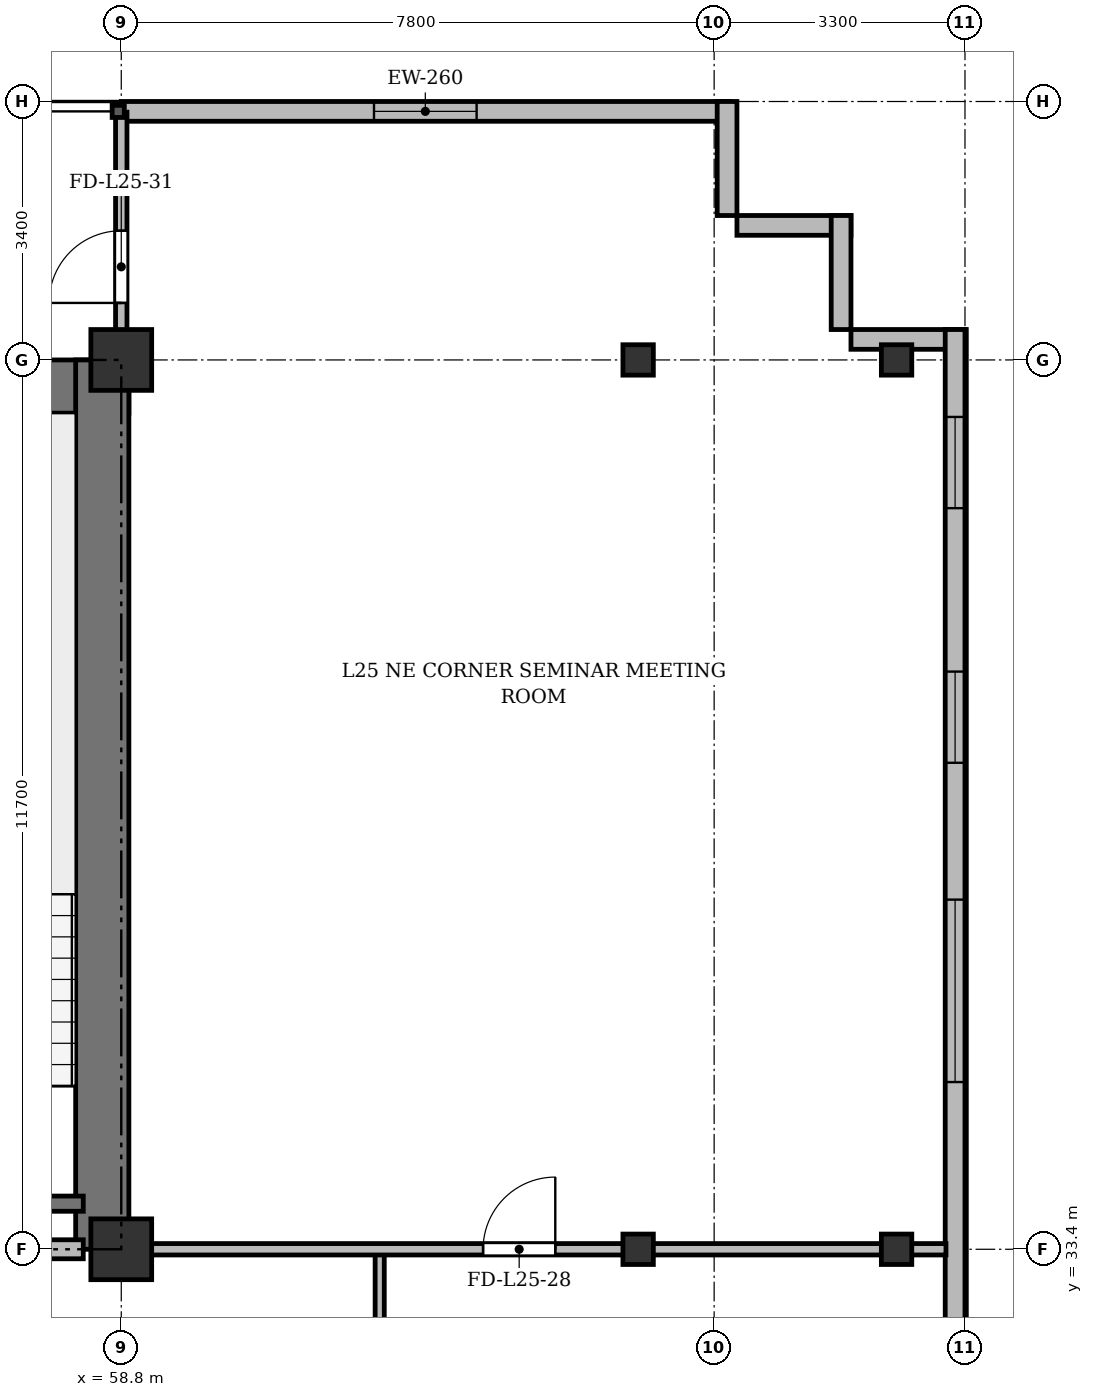
"""IFC4 building model, lengths in metres.
Left out: names, types, materials, properties, quantities, classifications, styles, units other than length and angle.
Written with IfcOpenShell. Run it as: python <this file> out.ifc"""

import sys

from ifc_helpers import new_model, si_unit, direction, frame, frame_2d, origin, origin_2d, place, context, subcontext, project, spatial, rectangle, i_section, extrude, source, transform, mapped, element, fill, save


model = new_model("IFC4")
c1 = context("Model", 3, precision=1e-05, world=origin(), true_north=direction((0.0, 1.0)))
c2 = subcontext(c1, "Body", "Model", "MODEL_VIEW")
j1 = project(units=[si_unit("LENGTHUNIT", "METRE"), si_unit("PLANEANGLEUNIT", "RADIAN")], contexts=[c1])
p1 = place(None, origin())
s1 = spatial("IfcSite", under=j1, at=p1, CompositionType="ELEMENT")
p2 = place(p1, origin())
s2 = spatial("IfcBuilding", under=s1, at=p2, CompositionType="ELEMENT")
p3 = place(p2, frame((0.0, 0.0, 99.7)))
s3 = spatial("IfcBuildingStorey", under=s2, at=p3, CompositionType="ELEMENT", Elevation=99.7)
m1 = source(origin(), c2, "Body", "SweptSolid", [
    extrude(rectangle(XDim=0.8, YDim=0.8, at=origin_2d()), origin(), (0.0, 0.0, 1.0), 3.6),
])
for number, where, z_axis, x_axis in (
    (1, (58.8, 33.4, 0.0), (0.0, 0.0, 1.0), (1.0, 0.0, 0.0)),
    (2, (58.8, 45.1, 0.0), (0.0, 0.0, 1.0), (1.0, 0.0, 0.0)),
):
    element("IfcColumn", number, at=place(p3, frame(where, z_axis=z_axis, x_axis=x_axis)), inside=s3, PredefinedType="COLUMN", context=c2, shape_type="MappedRepresentation", body=[
        mapped(m1, transform((0.0, 0.0, 0.0), x_axis=(1.0, 0.0, 0.0), y_axis=(0.0, 1.0, 0.0), z_axis=(0.0, 0.0, 1.0), scale=1.0)),
    ])
m2 = source(origin(), c2, "Body", "SweptSolid", [
    extrude(i_section(OverallWidth=0.4, OverallDepth=0.4, WebThickness=0.022, FlangeThickness=0.035, at=origin_2d()), origin(), (0.0, 0.0, 1.0), 3.6),
])
for number, where, z_axis, x_axis in (
    (3, (65.6, 33.4, 0.0), (0.0, 0.0, 1.0), (1.0, 0.0, 0.0)),
    (4, (65.6, 45.1, 0.0), (0.0, 0.0, 1.0), (1.0, 0.0, 0.0)),
    (5, (69.0, 33.4, 0.0), (0.0, 0.0, 1.0), (1.0, 0.0, 0.0)),
    (6, (69.0, 45.1, 0.0), (0.0, 0.0, 1.0), (1.0, 0.0, 0.0)),
):
    element("IfcColumn", number, at=place(p3, frame(where, z_axis=z_axis, x_axis=x_axis)), inside=s3, PredefinedType="COLUMN", context=c2, shape_type="MappedRepresentation", body=[
        mapped(m2, transform((0.0, 0.0, 0.0), x_axis=(1.0, 0.0, 0.0), y_axis=(0.0, 1.0, 0.0), z_axis=(0.0, 0.0, 1.0), scale=1.0)),
    ])
p4 = place(p3, frame((58.8, 48.37, 0.0), z_axis=(0.0, 0.0, 1.0), x_axis=(1.0, 0.0, 0.0)))
e7 = element("IfcWall", 7, at=p4, inside=s3, PredefinedType="SOLIDWALL", context=c2, shape_type="SweptSolid", body=[
    extrude(rectangle(XDim=8.0, YDim=0.26, at=frame_2d((4.0, 0.0))), origin(), (0.0, 0.0, 1.0), 3.34),
])
p5 = place(p4, frame((3.325, 0.0, 0.9)))
e8 = element("IfcOpeningElement", 8, at=p5, cuts=e7, PredefinedType="OPENING", context=c2, shape_type="SweptSolid", body=[
    extrude(rectangle(XDim=1.35, YDim=1.5, at=frame_2d((0.675, 0.75))), frame((0.0, 0.14, 0.0), z_axis=(0.0, -1.0, 0.0), x_axis=(1.0, 0.0, 0.0)), (0.0, 0.0, 1.0), 0.28),
])
for number, where, z_axis, x_axis in (
    (9, (66.77, 48.5, 0.0), (0.0, 0.0, 1.0), (0.0, -1.0, 0.0)),
    (10, (66.9, 46.87, 0.0), (0.0, 0.0, 1.0), (1.0, 0.0, 0.0)),
    (11, (68.27, 47.0, 0.0), (0.0, 0.0, 1.0), (0.0, -1.0, 0.0)),
):
    element("IfcWall", number, at=place(p3, frame(where, z_axis=z_axis, x_axis=x_axis)), inside=s3, PredefinedType="SOLIDWALL", context=c2, shape_type="SweptSolid", body=[
        extrude(rectangle(XDim=1.5, YDim=0.26, at=frame_2d((0.75, 0.0))), origin(), (0.0, 0.0, 1.0), 3.34),
    ])
p6 = place(p3, frame((68.4, 45.37, 0.0), z_axis=(0.0, 0.0, 1.0), x_axis=(1.0, 0.0, 0.0)))
e12 = element("IfcWall", 12, at=p6, inside=s3, PredefinedType="SOLIDWALL", context=c2, shape_type="SweptSolid", body=[
    extrude(rectangle(XDim=1.5, YDim=0.26, at=frame_2d((0.75, 0.0))), origin(), (0.0, 0.0, 1.0), 2.752),
])
p7 = place(p3, frame((69.77, 45.5, 0.0), z_axis=(0.0, 0.0, 1.0), x_axis=(0.0, -1.0, 0.0)))
e13 = element("IfcWall", 13, at=p7, inside=s3, PredefinedType="SOLIDWALL", context=c2, shape_type="SweptSolid", body=[
    extrude(rectangle(XDim=39.6, YDim=0.26, at=frame_2d((19.8, 0.0))), origin(), (0.0, 0.0, 1.0), 3.34),
])
p8 = place(p7, frame((36.95, 0.0, 0.92)))
e14 = element("IfcOpeningElement", 14, at=p8, cuts=e13, PredefinedType="OPENING", context=c2, shape_type="SweptSolid", body=[
    extrude(rectangle(XDim=1.2, YDim=1.65, at=frame_2d((0.6, 0.825))), frame((0.0, 0.14, 0.0), z_axis=(0.0, -1.0, 0.0), x_axis=(1.0, 0.0, 0.0)), (0.0, 0.0, 1.0), 0.28),
])
p9 = place(p7, frame((32.9, 0.0, 0.92)))
e15 = element("IfcOpeningElement", 15, at=p9, cuts=e13, PredefinedType="OPENING", context=c2, shape_type="SweptSolid", body=[
    extrude(rectangle(XDim=2.4, YDim=2.1, at=frame_2d((1.2, 1.05))), frame((0.0, 0.14, 0.0), z_axis=(0.0, -1.0, 0.0), x_axis=(1.0, 0.0, 0.0)), (0.0, 0.0, 1.0), 0.28),
])
p10 = place(p7, frame((28.7, 0.0, 0.92)))
e16 = element("IfcOpeningElement", 16, at=p10, cuts=e13, PredefinedType="OPENING", context=c2, shape_type="SweptSolid", body=[
    extrude(rectangle(XDim=2.4, YDim=2.1, at=frame_2d((1.2, 1.05))), frame((0.0, 0.14, 0.0), z_axis=(0.0, -1.0, 0.0), x_axis=(1.0, 0.0, 0.0)), (0.0, 0.0, 1.0), 0.28),
])
p11 = place(p7, frame((21.5, 0.0, 0.92)))
e17 = element("IfcOpeningElement", 17, at=p11, cuts=e13, PredefinedType="OPENING", context=c2, shape_type="SweptSolid", body=[
    extrude(rectangle(XDim=2.4, YDim=2.1, at=frame_2d((1.2, 1.05))), frame((0.0, 0.14, 0.0), z_axis=(0.0, -1.0, 0.0), x_axis=(1.0, 0.0, 0.0)), (0.0, 0.0, 1.0), 0.28),
])
p12 = place(p7, frame((7.5, 0.0, 0.92)))
e18 = element("IfcOpeningElement", 18, at=p12, cuts=e13, PredefinedType="OPENING", context=c2, shape_type="SweptSolid", body=[
    extrude(rectangle(XDim=2.4, YDim=2.1, at=frame_2d((1.2, 1.05))), frame((0.0, 0.14, 0.0), z_axis=(0.0, -1.0, 0.0), x_axis=(1.0, 0.0, 0.0)), (0.0, 0.0, 1.0), 0.28),
])
p13 = place(p7, frame((4.5, 0.0, 0.92)))
e19 = element("IfcOpeningElement", 19, at=p13, cuts=e13, PredefinedType="OPENING", context=c2, shape_type="SweptSolid", body=[
    extrude(rectangle(XDim=1.2, YDim=1.65, at=frame_2d((0.6, 0.825))), frame((0.0, 0.14, 0.0), z_axis=(0.0, -1.0, 0.0), x_axis=(1.0, 0.0, 0.0)), (0.0, 0.0, 1.0), 0.28),
])
p14 = place(p7, frame((1.15, 0.0, 0.92)))
e20 = element("IfcOpeningElement", 20, at=p14, cuts=e13, PredefinedType="OPENING", context=c2, shape_type="SweptSolid", body=[
    extrude(rectangle(XDim=1.2, YDim=1.65, at=frame_2d((0.6, 0.825))), frame((0.0, 0.14, 0.0), z_axis=(0.0, -1.0, 0.0), x_axis=(1.0, 0.0, 0.0)), (0.0, 0.0, 1.0), 0.28),
])
p15 = place(p3, frame((15.5, 44.75, 0.0), z_axis=(0.0, 0.0, 1.0), x_axis=(1.0, 0.0, 0.0)))
e21 = element("IfcWall", 21, at=p15, inside=s3, PredefinedType="SHEAR", context=c2, shape_type="SweptSolid", body=[
    extrude(rectangle(XDim=43.4, YDim=0.7, at=frame_2d((21.7, 0.0))), origin(), (0.0, 0.0, 1.0), 3.34),
])
p16 = place(p3, frame((58.55, 33.4, 0.0), z_axis=(0.0, 0.0, 1.0), x_axis=(0.0, 1.0, 0.0)))
e22 = element("IfcWall", 22, at=p16, inside=s3, PredefinedType="SHEAR", context=c2, shape_type="SweptSolid", body=[
    extrude(rectangle(XDim=11.7, YDim=0.7, at=frame_2d((5.85, 0.0))), origin(), (0.0, 0.0, 1.0), 3.34),
])
p17 = place(p3, frame((54.9, 34.0, 0.0), z_axis=(0.0, 0.0, 1.0), x_axis=(1.0, 0.0, 0.0)))
e23 = element("IfcWall", 23, at=p17, inside=s3, PredefinedType="SHEAR", context=c2, shape_type="SweptSolid", body=[
    extrude(rectangle(XDim=3.4, YDim=0.2, at=frame_2d((1.7, 0.0))), origin(), (0.0, 0.0, 1.0), 3.34),
])
p18 = place(p3, frame((47.15, 33.4, 0.0), z_axis=(0.0, 0.0, 1.0), x_axis=(1.0, 0.0, 0.0)))
e24 = element("IfcWall", 24, at=p18, inside=s3, PredefinedType="PARTITIONING", context=c2, shape_type="SweptSolid", body=[
    extrude(rectangle(XDim=11.15, YDim=0.25, at=frame_2d((5.575, 0.0))), origin(), (0.0, 0.0, 1.0), 2.752),
])
p19 = place(p18, frame((0.7, 0.0, 0.0)))
e25 = element("IfcOpeningElement", 25, at=p19, cuts=e24, PredefinedType="OPENING", context=c2, shape_type="SweptSolid", body=[
    extrude(rectangle(XDim=0.95, YDim=2.15, at=frame_2d((0.475, 1.075))), frame((0.0, 0.135, 0.0), z_axis=(0.0, -1.0, 0.0), x_axis=(1.0, 0.0, 0.0)), (0.0, 0.0, 1.0), 0.27),
])
p20 = place(p18, frame((6.0, 0.0, 0.0)))
e26 = element("IfcOpeningElement", 26, at=p20, cuts=e24, PredefinedType="OPENING", context=c2, shape_type="SweptSolid", body=[
    extrude(rectangle(XDim=1.2, YDim=2.15, at=frame_2d((0.6, 1.075))), frame((0.0, 0.135, 0.0), z_axis=(0.0, -1.0, 0.0), x_axis=(1.0, 0.0, 0.0)), (0.0, 0.0, 1.0), 0.27),
])
p21 = place(p3, frame((62.2, 29.8, 0.0), z_axis=(0.0, 0.0, 1.0), x_axis=(0.0, 1.0, 0.0)))
e27 = element("IfcWall", 27, at=p21, inside=s3, PredefinedType="PARTITIONING", context=c2, shape_type="SweptSolid", body=[
    extrude(rectangle(XDim=3.6, YDim=0.12, at=frame_2d((1.8, 0.0))), origin(), (0.0, 0.0, 1.0), 2.752),
])
p22 = place(p3, frame((58.8, 33.4, 0.0), z_axis=(0.0, 0.0, 1.0), x_axis=(1.0, 0.0, 0.0)))
e28 = element("IfcWall", 28, at=p22, inside=s3, PredefinedType="PARTITIONING", context=c2, shape_type="SweptSolid", body=[
    extrude(rectangle(XDim=10.85, YDim=0.15, at=frame_2d((5.425, 0.0))), origin(), (0.0, 0.0, 1.0), 2.752),
])
p23 = place(p22, frame((4.76, 0.0, 0.0)))
e29 = element("IfcOpeningElement", 29, at=p23, cuts=e28, PredefinedType="OPENING", context=c2, shape_type="SweptSolid", body=[
    extrude(rectangle(XDim=0.95, YDim=2.15, at=frame_2d((0.475, 1.075))), frame((0.0, 0.085, 0.0), z_axis=(0.0, -1.0, 0.0), x_axis=(1.0, 0.0, 0.0)), (0.0, 0.0, 1.0), 0.17),
])
p24 = place(p3, frame((58.8, 44.75, 0.0), z_axis=(0.0, 0.0, 1.0), x_axis=(0.0, 1.0, 0.0)))
e30 = element("IfcWall", 30, at=p24, inside=s3, PredefinedType="PARTITIONING", context=c2, shape_type="SweptSolid", body=[
    extrude(rectangle(XDim=3.61, YDim=0.15, at=frame_2d((1.805, 0.0))), origin(), (0.0, 0.0, 1.0), 2.84),
])
p25 = place(p24, frame((1.1, 0.0, 0.0)))
e31 = element("IfcOpeningElement", 31, at=p25, cuts=e30, PredefinedType="OPENING", context=c2, shape_type="SweptSolid", body=[
    extrude(rectangle(XDim=0.95, YDim=2.15, at=frame_2d((0.475, 1.075))), frame((0.0, 0.085, 0.0), z_axis=(0.0, -1.0, 0.0), x_axis=(1.0, 0.0, 0.0)), (0.0, 0.0, 1.0), 0.17),
])
m3 = source(origin(), c2, "Body", "SweptSolid", [
    extrude(rectangle(XDim=1.35, YDim=1.5, at=frame_2d((0.675, 0.75))), frame((0.0, 0.03, 0.0), z_axis=(0.0, -1.0, 0.0), x_axis=(1.0, 0.0, 0.0)), (0.0, 0.0, 1.0), 0.06),
])
p26 = place(p5, origin())
e32 = element("IfcWindow", 32, at=p26, inside=s3, PartitioningType="SINGLE_PANEL", PredefinedType="WINDOW", context=c2, shape_type="MappedRepresentation", body=[
    mapped(m3, transform((0.0, 0.0, 0.0), x_axis=(1.0, 0.0, 0.0), y_axis=(0.0, 1.0, 0.0), z_axis=(0.0, 0.0, 1.0), scale=1.0)),
])
fill(e8, e32)
m4 = source(origin(), c2, "Body", "SweptSolid", [
    extrude(rectangle(XDim=2.4, YDim=2.1, at=frame_2d((1.2, 1.05))), frame((0.0, 0.03, 0.0), z_axis=(0.0, -1.0, 0.0), x_axis=(1.0, 0.0, 0.0)), (0.0, 0.0, 1.0), 0.06),
])
p27 = place(p12, origin())
e33 = element("IfcWindow", 33, at=p27, inside=s3, PartitioningType="SINGLE_PANEL", PredefinedType="WINDOW", context=c2, shape_type="MappedRepresentation", body=[
    mapped(m4, transform((0.0, 0.0, 0.0), x_axis=(1.0, 0.0, 0.0), y_axis=(0.0, 1.0, 0.0), z_axis=(0.0, 0.0, 1.0), scale=1.0)),
])
fill(e18, e33)
m5 = source(origin(), c2, "Body", "SweptSolid", [
    extrude(rectangle(XDim=1.2, YDim=1.65, at=frame_2d((0.6, 0.825))), frame((0.0, 0.03, 0.0), z_axis=(0.0, -1.0, 0.0), x_axis=(1.0, 0.0, 0.0)), (0.0, 0.0, 1.0), 0.06),
])
p28 = place(p13, origin())
e34 = element("IfcWindow", 34, at=p28, inside=s3, PartitioningType="SINGLE_PANEL", PredefinedType="WINDOW", context=c2, shape_type="MappedRepresentation", body=[
    mapped(m5, transform((0.0, 0.0, 0.0), x_axis=(1.0, 0.0, 0.0), y_axis=(0.0, 1.0, 0.0), z_axis=(0.0, 0.0, 1.0), scale=1.0)),
])
fill(e19, e34)
p29 = place(p14, origin())
e35 = element("IfcWindow", 35, at=p29, inside=s3, PartitioningType="SINGLE_PANEL", PredefinedType="WINDOW", context=c2, shape_type="MappedRepresentation", body=[
    mapped(m5, transform((0.0, 0.0, 0.0), x_axis=(1.0, 0.0, 0.0), y_axis=(0.0, 1.0, 0.0), z_axis=(0.0, 0.0, 1.0), scale=1.0)),
])
fill(e20, e35)
m6 = source(origin(), c2, "Body", "SweptSolid", [
    extrude(rectangle(XDim=0.95, YDim=2.15, at=frame_2d((0.475, 1.075))), frame((0.0, 0.025, 0.0), z_axis=(0.0, -1.0, 0.0), x_axis=(1.0, 0.0, 0.0)), (0.0, 0.0, 1.0), 0.05),
])
p30 = place(p23, origin())
e36 = element("IfcDoor", 36, at=p30, inside=s3, OperationType="SINGLE_SWING_RIGHT", PredefinedType="DOOR", context=c2, shape_type="MappedRepresentation", body=[
    mapped(m6, transform((0.0, 0.0, 0.0), x_axis=(1.0, 0.0, 0.0), y_axis=(0.0, 1.0, 0.0), z_axis=(0.0, 0.0, 1.0), scale=1.0)),
])
fill(e29, e36)
p31 = place(p25, origin())
e37 = element("IfcDoor", 37, at=p31, inside=s3, OperationType="SINGLE_SWING_LEFT", PredefinedType="DOOR", context=c2, shape_type="MappedRepresentation", body=[
    mapped(m6, transform((0.0, 0.0, 0.0), x_axis=(1.0, 0.0, 0.0), y_axis=(0.0, 1.0, 0.0), z_axis=(0.0, 0.0, 1.0), scale=1.0)),
])
fill(e31, e37)
save(model, sys.argv[1])
